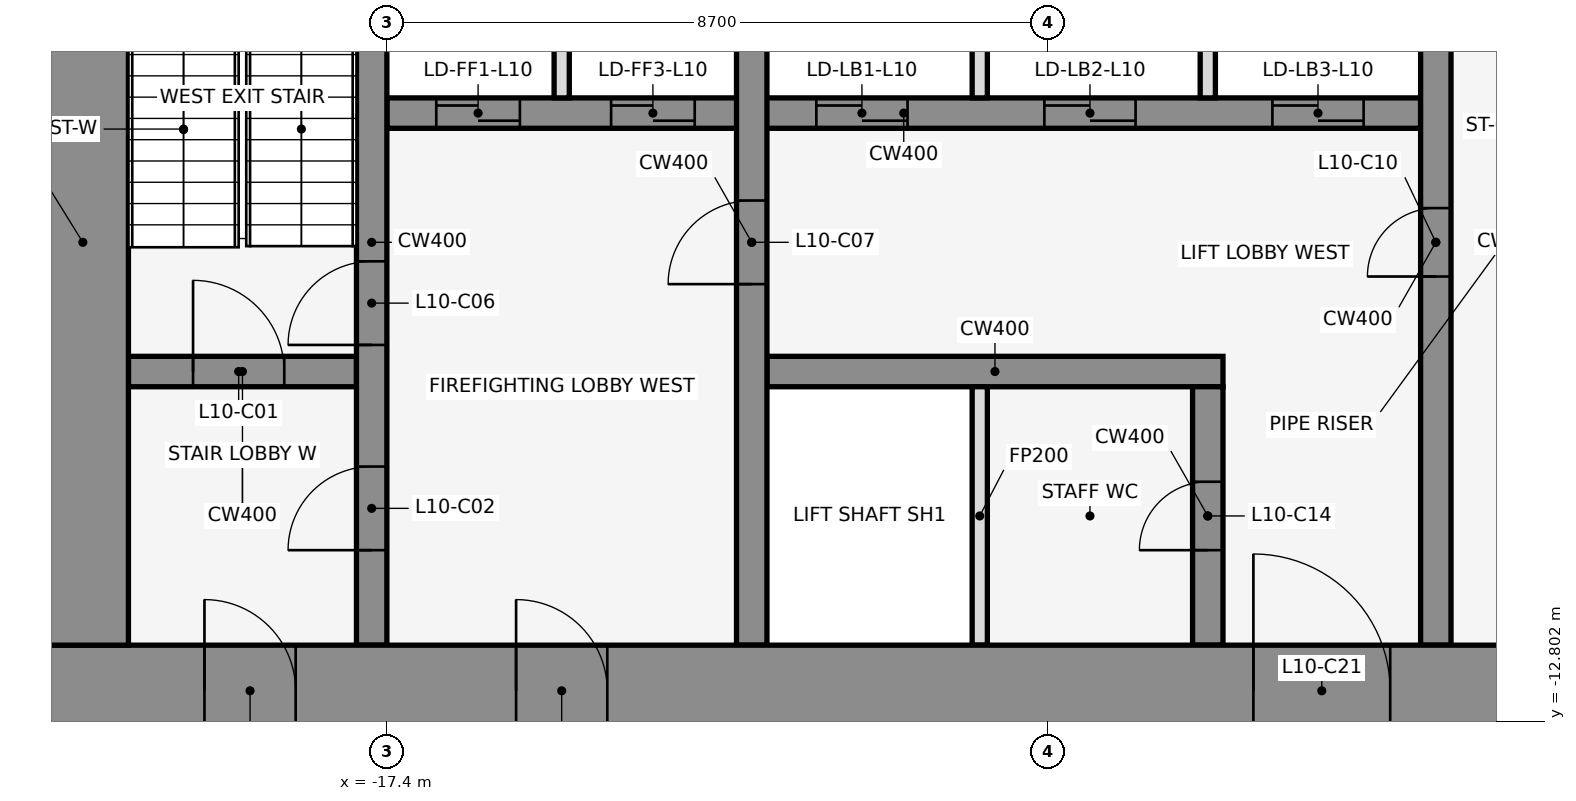
"""IFC4 building model, lengths in metres.
Left out: names, types, materials, properties, quantities, classifications, styles, units other than length and angle.
Written with IfcOpenShell. Run it as: python <this file> out.ifc"""

import sys

from ifc_helpers import new_model, si_unit, direction, frame, frame_2d, origin, place, context, subcontext, project, spatial, rectangle, extrude, element, fill, save


model = new_model("IFC4")
c1 = context("Model", 3, precision=1e-05, world=origin(), true_north=direction((0.0, 1.0)))
c2 = subcontext(c1, "Body", "Model", "MODEL_VIEW")
j1 = project(units=[si_unit("LENGTHUNIT", "METRE"), si_unit("PLANEANGLEUNIT", "RADIAN")], contexts=[c1])
p1 = place(None, origin())
s1 = spatial("IfcSite", under=j1, at=p1, CompositionType="ELEMENT")
p2 = place(p1, origin())
s2 = spatial("IfcBuilding", under=s1, at=p2, CompositionType="ELEMENT")
p3 = place(p2, frame((0.0, 0.0, 53.0)))
s3 = spatial("IfcBuildingStorey", under=s2, at=p3, CompositionType="ELEMENT", Elevation=53.0)
p4 = place(p3, frame((-20.8, -8.2, 0.0), z_axis=(0.0, 0.0, 1.0), x_axis=(1.0, 0.0, 0.0)))
e1 = element("IfcWall", 1, at=p4, inside=s3, PredefinedType="SHEAR", context=c2, shape_type="SweptSolid", body=[
    extrude(rectangle(XDim=3.0, YDim=0.4, at=frame_2d((1.5, 0.0))), origin(), (0.0, 0.0, 1.0), 4.5),
])
p5 = place(p4, frame((0.85, 0.0, 0.0)))
e2 = element("IfcOpeningElement", 2, at=p5, cuts=e1, PredefinedType="OPENING", context=c2, shape_type="SweptSolid", body=[
    extrude(rectangle(XDim=1.2, YDim=2.1, at=frame_2d((0.6, 1.05))), frame((0.0, 0.212, 0.0), z_axis=(0.0, -1.0, 0.0), x_axis=(1.0, 0.0, 0.0)), (0.0, 0.0, 1.0), 0.424),
])
p6 = place(p3, frame((-12.4, -8.2, 0.0), z_axis=(0.0, 0.0, 1.0), x_axis=(1.0, 0.0, 0.0)))
e3 = element("IfcWall", 3, at=p6, inside=s3, PredefinedType="SHEAR", context=c2, shape_type="SweptSolid", body=[
    extrude(rectangle(XDim=6.0, YDim=0.4, at=frame_2d((3.0, 0.0))), origin(), (0.0, 0.0, 1.0), 4.5),
])
p7 = place(p3, frame((-17.4, -4.8, 0.0), z_axis=(0.0, 0.0, 1.0), x_axis=(1.0, 0.0, 0.0)))
e4 = element("IfcWall", 4, at=p7, inside=s3, PredefinedType="SHEAR", context=c2, shape_type="SweptSolid", body=[
    extrude(rectangle(XDim=13.6, YDim=0.4, at=frame_2d((6.8, 0.0))), origin(), (0.0, 0.0, 1.0), 4.5),
])
p8 = place(p7, frame((0.65, 0.0, 0.0)))
e5 = element("IfcOpeningElement", 5, at=p8, cuts=e4, PredefinedType="OPENING", context=c2, shape_type="SweptSolid", body=[
    extrude(rectangle(XDim=1.1, YDim=2.1, at=frame_2d((0.55, 1.05))), frame((0.0, 0.212, 0.0), z_axis=(0.0, -1.0, 0.0), x_axis=(1.0, 0.0, 0.0)), (0.0, 0.0, 1.0), 0.424),
])
p9 = place(p7, frame((2.95, 0.0, 0.0)))
e6 = element("IfcOpeningElement", 6, at=p9, cuts=e4, PredefinedType="OPENING", context=c2, shape_type="SweptSolid", body=[
    extrude(rectangle(XDim=1.1, YDim=2.1, at=frame_2d((0.55, 1.05))), frame((0.0, 0.212, 0.0), z_axis=(0.0, -1.0, 0.0), x_axis=(1.0, 0.0, 0.0)), (0.0, 0.0, 1.0), 0.424),
])
p10 = place(p7, frame((5.65, 0.0, 0.0)))
e7 = element("IfcOpeningElement", 7, at=p10, cuts=e4, PredefinedType="OPENING", context=c2, shape_type="SweptSolid", body=[
    extrude(rectangle(XDim=1.2, YDim=2.1, at=frame_2d((0.6, 1.05))), frame((0.0, 0.212, 0.0), z_axis=(0.0, -1.0, 0.0), x_axis=(1.0, 0.0, 0.0)), (0.0, 0.0, 1.0), 0.424),
])
p11 = place(p7, frame((8.65, 0.0, 0.0)))
e8 = element("IfcOpeningElement", 8, at=p11, cuts=e4, PredefinedType="OPENING", context=c2, shape_type="SweptSolid", body=[
    extrude(rectangle(XDim=1.2, YDim=2.1, at=frame_2d((0.6, 1.05))), frame((0.0, 0.212, 0.0), z_axis=(0.0, -1.0, 0.0), x_axis=(1.0, 0.0, 0.0)), (0.0, 0.0, 1.0), 0.424),
])
p12 = place(p7, frame((11.65, 0.0, 0.0)))
e9 = element("IfcOpeningElement", 9, at=p12, cuts=e4, PredefinedType="OPENING", context=c2, shape_type="SweptSolid", body=[
    extrude(rectangle(XDim=1.2, YDim=2.1, at=frame_2d((0.6, 1.05))), frame((0.0, 0.212, 0.0), z_axis=(0.0, -1.0, 0.0), x_axis=(1.0, 0.0, 0.0)), (0.0, 0.0, 1.0), 0.424),
])
p13 = place(p3, frame((-17.6, -11.8, 0.0), z_axis=(0.0, 0.0, 1.0), x_axis=(0.0, 1.0, 0.0)))
e10 = element("IfcWall", 10, at=p13, inside=s3, PredefinedType="SHEAR", context=c2, shape_type="SweptSolid", body=[
    extrude(rectangle(XDim=10.6, YDim=0.4, at=frame_2d((5.3, 0.0))), origin(), (0.0, 0.0, 1.0), 4.5),
])
p14 = place(p13, frame((1.25, 0.0, 0.0)))
e11 = element("IfcOpeningElement", 11, at=p14, cuts=e10, PredefinedType="OPENING", context=c2, shape_type="SweptSolid", body=[
    extrude(rectangle(XDim=1.1, YDim=2.1, at=frame_2d((0.55, 1.05))), frame((0.0, 0.212, 0.0), z_axis=(0.0, -1.0, 0.0), x_axis=(1.0, 0.0, 0.0)), (0.0, 0.0, 1.0), 0.424),
])
p15 = place(p13, frame((3.95, 0.0, 0.0)))
e12 = element("IfcOpeningElement", 12, at=p15, cuts=e10, PredefinedType="OPENING", context=c2, shape_type="SweptSolid", body=[
    extrude(rectangle(XDim=1.1, YDim=2.1, at=frame_2d((0.55, 1.05))), frame((0.0, 0.212, 0.0), z_axis=(0.0, -1.0, 0.0), x_axis=(1.0, 0.0, 0.0)), (0.0, 0.0, 1.0), 0.424),
])
p16 = place(p3, frame((-15.1, -4.6, 0.0), z_axis=(0.0, 0.0, 1.0), x_axis=(0.0, 1.0, 0.0)))
e13 = element("IfcWall", 13, at=p16, inside=s3, PredefinedType="PARTITIONING", context=c2, shape_type="SweptSolid", body=[
    extrude(rectangle(XDim=3.4, YDim=0.2, at=frame_2d((1.7, 0.0))), origin(), (0.0, 0.0, 1.0), 3.418),
])
p17 = place(p3, frame((-12.6, -11.8, 0.0), z_axis=(0.0, 0.0, 1.0), x_axis=(0.0, 1.0, 0.0)))
e14 = element("IfcWall", 14, at=p17, inside=s3, PredefinedType="SHEAR", context=c2, shape_type="SweptSolid", body=[
    extrude(rectangle(XDim=10.6, YDim=0.4, at=frame_2d((5.3, 0.0))), origin(), (0.0, 0.0, 1.0), 4.5),
])
p18 = place(p17, frame((4.75, 0.0, 0.0)))
e15 = element("IfcOpeningElement", 15, at=p18, cuts=e14, PredefinedType="OPENING", context=c2, shape_type="SweptSolid", body=[
    extrude(rectangle(XDim=1.1, YDim=2.1, at=frame_2d((0.55, 1.05))), frame((0.0, 0.212, 0.0), z_axis=(0.0, -1.0, 0.0), x_axis=(1.0, 0.0, 0.0)), (0.0, 0.0, 1.0), 0.424),
])
for number, where, z_axis, x_axis in (
    (16, (-9.6, -11.8, 0.0), (0.0, 0.0, 1.0), (0.0, 1.0, 0.0)),
    (17, (-9.6, -4.6, 0.0), (0.0, 0.0, 1.0), (0.0, 1.0, 0.0)),
):
    element("IfcWall", number, at=place(p3, frame(where, z_axis=z_axis, x_axis=x_axis)), inside=s3, PredefinedType="PARTITIONING", context=c2, shape_type="SweptSolid", body=[
        extrude(rectangle(XDim=3.4, YDim=0.2, at=frame_2d((1.7, 0.0))), origin(), (0.0, 0.0, 1.0), 3.418),
    ])
p19 = place(p3, frame((-6.6, -11.8, 0.0), z_axis=(0.0, 0.0, 1.0), x_axis=(0.0, 1.0, 0.0)))
e18 = element("IfcWall", 18, at=p19, inside=s3, PredefinedType="SHEAR", context=c2, shape_type="SweptSolid", body=[
    extrude(rectangle(XDim=3.4, YDim=0.4, at=frame_2d((1.7, 0.0))), origin(), (0.0, 0.0, 1.0), 4.5),
])
p20 = place(p19, frame((1.25, 0.0, 0.0)))
e19 = element("IfcOpeningElement", 19, at=p20, cuts=e18, PredefinedType="OPENING", context=c2, shape_type="SweptSolid", body=[
    extrude(rectangle(XDim=0.9, YDim=2.1, at=frame_2d((0.45, 1.05))), frame((0.0, 0.212, 0.0), z_axis=(0.0, -1.0, 0.0), x_axis=(1.0, 0.0, 0.0)), (0.0, 0.0, 1.0), 0.424),
])
p21 = place(p3, frame((-6.6, -4.6, 0.0), z_axis=(0.0, 0.0, 1.0), x_axis=(0.0, 1.0, 0.0)))
e20 = element("IfcWall", 20, at=p21, inside=s3, PredefinedType="PARTITIONING", context=c2, shape_type="SweptSolid", body=[
    extrude(rectangle(XDim=3.4, YDim=0.2, at=frame_2d((1.7, 0.0))), origin(), (0.0, 0.0, 1.0), 3.418),
])
p22 = place(p3, frame((-3.6, -11.8, 0.0), z_axis=(0.0, 0.0, 1.0), x_axis=(0.0, 1.0, 0.0)))
e21 = element("IfcWall", 21, at=p22, inside=s3, PredefinedType="SHEAR", context=c2, shape_type="SweptSolid", body=[
    extrude(rectangle(XDim=10.6, YDim=0.4, at=frame_2d((5.3, 0.0))), origin(), (0.0, 0.0, 1.0), 4.5),
])
p23 = place(p22, frame((4.85, 0.0, 0.0)))
e22 = element("IfcOpeningElement", 22, at=p23, cuts=e21, PredefinedType="OPENING", context=c2, shape_type="SweptSolid", body=[
    extrude(rectangle(XDim=0.9, YDim=2.1, at=frame_2d((0.45, 1.05))), frame((0.0, 0.212, 0.0), z_axis=(0.0, -1.0, 0.0), x_axis=(1.0, 0.0, 0.0)), (0.0, 0.0, 1.0), 0.424),
])
p24 = place(p3, frame((-22.0, -12.4, 0.0), z_axis=(0.0, 0.0, 1.0), x_axis=(1.0, 0.0, 0.0)))
e23 = element("IfcWall", 23, at=p24, inside=s3, PredefinedType="SHEAR", context=c2, shape_type="SweptSolid", body=[
    extrude(rectangle(XDim=44.0, YDim=1.2, at=frame_2d((22.0, 0.0))), origin(), (0.0, 0.0, 1.0), 4.5),
])
p25 = place(p24, frame((2.2, 0.0, 0.0)))
e24 = element("IfcOpeningElement", 24, at=p25, cuts=e23, PredefinedType="OPENING", context=c2, shape_type="SweptSolid", body=[
    extrude(rectangle(XDim=1.2, YDim=2.1, at=frame_2d((0.6, 1.05))), frame((0.0, 0.612, 0.0), z_axis=(0.0, -1.0, 0.0), x_axis=(1.0, 0.0, 0.0)), (0.0, 0.0, 1.0), 1.224),
])
p26 = place(p24, frame((21.4, 0.0, 0.0)))
e25 = element("IfcOpeningElement", 25, at=p26, cuts=e23, PredefinedType="OPENING", context=c2, shape_type="SweptSolid", body=[
    extrude(rectangle(XDim=1.2, YDim=2.1, at=frame_2d((0.6, 1.05))), frame((0.0, 0.612, 0.0), z_axis=(0.0, -1.0, 0.0), x_axis=(1.0, 0.0, 0.0)), (0.0, 0.0, 1.0), 1.224),
])
p27 = place(p24, frame((40.6, 0.0, 0.0)))
e26 = element("IfcOpeningElement", 26, at=p27, cuts=e23, PredefinedType="OPENING", context=c2, shape_type="SweptSolid", body=[
    extrude(rectangle(XDim=1.2, YDim=2.1, at=frame_2d((0.6, 1.05))), frame((0.0, 0.612, 0.0), z_axis=(0.0, -1.0, 0.0), x_axis=(1.0, 0.0, 0.0)), (0.0, 0.0, 1.0), 1.224),
])
p28 = place(p24, frame((16.0, 0.0, 0.0)))
e27 = element("IfcOpeningElement", 27, at=p28, cuts=e23, PredefinedType="OPENING", context=c2, shape_type="SweptSolid", body=[
    extrude(rectangle(XDim=1.8, YDim=2.1, at=frame_2d((0.9, 1.05))), frame((0.0, 0.612, 0.0), z_axis=(0.0, -1.0, 0.0), x_axis=(1.0, 0.0, 0.0)), (0.0, 0.0, 1.0), 1.224),
])
p29 = place(p24, frame((6.3, 0.0, 0.0)))
e28 = element("IfcOpeningElement", 28, at=p29, cuts=e23, PredefinedType="OPENING", context=c2, shape_type="SweptSolid", body=[
    extrude(rectangle(XDim=1.2, YDim=2.1, at=frame_2d((0.6, 1.05))), frame((0.0, 0.612, 0.0), z_axis=(0.0, -1.0, 0.0), x_axis=(1.0, 0.0, 0.0)), (0.0, 0.0, 1.0), 1.224),
])
p30 = place(p24, frame((26.2, 0.0, 0.0)))
e29 = element("IfcOpeningElement", 29, at=p30, cuts=e23, PredefinedType="OPENING", context=c2, shape_type="SweptSolid", body=[
    extrude(rectangle(XDim=1.8, YDim=2.1, at=frame_2d((0.9, 1.05))), frame((0.0, 0.612, 0.0), z_axis=(0.0, -1.0, 0.0), x_axis=(1.0, 0.0, 0.0)), (0.0, 0.0, 1.0), 1.224),
])
p31 = place(p24, frame((36.5, 0.0, 0.0)))
e30 = element("IfcOpeningElement", 30, at=p31, cuts=e23, PredefinedType="OPENING", context=c2, shape_type="SweptSolid", body=[
    extrude(rectangle(XDim=1.2, YDim=2.1, at=frame_2d((0.6, 1.05))), frame((0.0, 0.612, 0.0), z_axis=(0.0, -1.0, 0.0), x_axis=(1.0, 0.0, 0.0)), (0.0, 0.0, 1.0), 1.224),
])
p32 = place(p3, frame((-21.4, -11.8, 0.0), z_axis=(0.0, 0.0, 1.0), x_axis=(0.0, 1.0, 0.0)))
e31 = element("IfcWall", 31, at=p32, inside=s3, PredefinedType="SHEAR", context=c2, shape_type="SweptSolid", body=[
    extrude(rectangle(XDim=10.6, YDim=1.2, at=frame_2d((5.3, 0.0))), origin(), (0.0, 0.0, 1.0), 4.5),
])
p33 = place(p5, origin())
e32 = element("IfcDoor", 32, at=p33, inside=s3, OperationType="SINGLE_SWING_LEFT", PredefinedType="DOOR", context=c2, shape_type="SweptSolid", body=[
    extrude(rectangle(XDim=1.2, YDim=2.1, at=frame_2d((0.6, 1.05))), frame((0.0, 0.025, 0.0), z_axis=(0.0, -1.0, 0.0), x_axis=(1.0, 0.0, 0.0)), (0.0, 0.0, 1.0), 0.05),
])
fill(e2, e32)
p34 = place(p14, frame((1.1, 0.0, 0.0), z_axis=(0.0, 0.0, 1.0), x_axis=(-1.0, 0.0, 0.0)))
e33 = element("IfcDoor", 33, at=p34, inside=s3, OperationType="SINGLE_SWING_LEFT", PredefinedType="DOOR", context=c2, shape_type="SweptSolid", body=[
    extrude(rectangle(XDim=1.1, YDim=2.1, at=frame_2d((0.55, 1.05))), frame((0.0, 0.025, 0.0), z_axis=(0.0, -1.0, 0.0), x_axis=(1.0, 0.0, 0.0)), (0.0, 0.0, 1.0), 0.05),
])
fill(e11, e33)
p35 = place(p8, origin())
e34 = element("IfcDoor", 34, at=p35, inside=s3, OperationType="DOUBLE_DOOR_SLIDING", PredefinedType="DOOR", context=c2, shape_type="SweptSolid", body=[
    extrude(rectangle(XDim=1.1, YDim=2.1, at=frame_2d((0.55, 1.05))), frame((0.0, 0.025, 0.0), z_axis=(0.0, -1.0, 0.0), x_axis=(1.0, 0.0, 0.0)), (0.0, 0.0, 1.0), 0.05),
])
fill(e5, e34)
p36 = place(p9, origin())
e35 = element("IfcDoor", 35, at=p36, inside=s3, OperationType="DOUBLE_DOOR_SLIDING", PredefinedType="DOOR", context=c2, shape_type="SweptSolid", body=[
    extrude(rectangle(XDim=1.1, YDim=2.1, at=frame_2d((0.55, 1.05))), frame((0.0, 0.025, 0.0), z_axis=(0.0, -1.0, 0.0), x_axis=(1.0, 0.0, 0.0)), (0.0, 0.0, 1.0), 0.05),
])
fill(e6, e35)
p37 = place(p10, origin())
e36 = element("IfcDoor", 36, at=p37, inside=s3, OperationType="DOUBLE_DOOR_SLIDING", PredefinedType="DOOR", context=c2, shape_type="SweptSolid", body=[
    extrude(rectangle(XDim=1.2, YDim=2.1, at=frame_2d((0.6, 1.05))), frame((0.0, 0.025, 0.0), z_axis=(0.0, -1.0, 0.0), x_axis=(1.0, 0.0, 0.0)), (0.0, 0.0, 1.0), 0.05),
])
fill(e7, e36)
p38 = place(p11, origin())
e37 = element("IfcDoor", 37, at=p38, inside=s3, OperationType="DOUBLE_DOOR_SLIDING", PredefinedType="DOOR", context=c2, shape_type="SweptSolid", body=[
    extrude(rectangle(XDim=1.2, YDim=2.1, at=frame_2d((0.6, 1.05))), frame((0.0, 0.025, 0.0), z_axis=(0.0, -1.0, 0.0), x_axis=(1.0, 0.0, 0.0)), (0.0, 0.0, 1.0), 0.05),
])
fill(e8, e37)
p39 = place(p12, origin())
e38 = element("IfcDoor", 38, at=p39, inside=s3, OperationType="DOUBLE_DOOR_SLIDING", PredefinedType="DOOR", context=c2, shape_type="SweptSolid", body=[
    extrude(rectangle(XDim=1.2, YDim=2.1, at=frame_2d((0.6, 1.05))), frame((0.0, 0.025, 0.0), z_axis=(0.0, -1.0, 0.0), x_axis=(1.0, 0.0, 0.0)), (0.0, 0.0, 1.0), 0.05),
])
fill(e9, e38)
p40 = place(p15, frame((1.1, 0.0, 0.0), z_axis=(0.0, 0.0, 1.0), x_axis=(-1.0, 0.0, 0.0)))
e39 = element("IfcDoor", 39, at=p40, inside=s3, OperationType="SINGLE_SWING_LEFT", PredefinedType="DOOR", context=c2, shape_type="SweptSolid", body=[
    extrude(rectangle(XDim=1.1, YDim=2.1, at=frame_2d((0.55, 1.05))), frame((0.0, 0.025, 0.0), z_axis=(0.0, -1.0, 0.0), x_axis=(1.0, 0.0, 0.0)), (0.0, 0.0, 1.0), 0.05),
])
fill(e12, e39)
p41 = place(p18, origin())
e40 = element("IfcDoor", 40, at=p41, inside=s3, OperationType="SINGLE_SWING_LEFT", PredefinedType="DOOR", context=c2, shape_type="SweptSolid", body=[
    extrude(rectangle(XDim=1.1, YDim=2.1, at=frame_2d((0.55, 1.05))), frame((0.0, 0.025, 0.0), z_axis=(0.0, -1.0, 0.0), x_axis=(1.0, 0.0, 0.0)), (0.0, 0.0, 1.0), 0.05),
])
fill(e15, e40)
p42 = place(p23, frame((0.9, 0.0, 0.0), z_axis=(0.0, 0.0, 1.0), x_axis=(-1.0, 0.0, 0.0)))
e41 = element("IfcDoor", 41, at=p42, inside=s3, OperationType="SINGLE_SWING_LEFT", PredefinedType="DOOR", context=c2, shape_type="SweptSolid", body=[
    extrude(rectangle(XDim=0.9, YDim=2.1, at=frame_2d((0.45, 1.05))), frame((0.0, 0.025, 0.0), z_axis=(0.0, -1.0, 0.0), x_axis=(1.0, 0.0, 0.0)), (0.0, 0.0, 1.0), 0.05),
])
fill(e22, e41)
p43 = place(p20, origin())
e42 = element("IfcDoor", 42, at=p43, inside=s3, OperationType="SINGLE_SWING_RIGHT", PredefinedType="DOOR", context=c2, shape_type="SweptSolid", body=[
    extrude(rectangle(XDim=0.9, YDim=2.1, at=frame_2d((0.45, 1.05))), frame((0.0, 0.025, 0.0), z_axis=(0.0, -1.0, 0.0), x_axis=(1.0, 0.0, 0.0)), (0.0, 0.0, 1.0), 0.05),
])
fill(e19, e42)
p44 = place(p25, frame((1.2, 0.0, 0.0), z_axis=(0.0, 0.0, 1.0), x_axis=(-1.0, 0.0, 0.0)))
e43 = element("IfcDoor", 43, at=p44, inside=s3, OperationType="SINGLE_SWING_RIGHT", PredefinedType="DOOR", context=c2, shape_type="SweptSolid", body=[
    extrude(rectangle(XDim=1.2, YDim=2.1, at=frame_2d((0.6, 1.05))), frame((0.0, 0.025, 0.0), z_axis=(0.0, -1.0, 0.0), x_axis=(1.0, 0.0, 0.0)), (0.0, 0.0, 1.0), 0.05),
])
fill(e24, e43)
p45 = place(p28, origin())
e44 = element("IfcDoor", 44, at=p45, inside=s3, OperationType="SINGLE_SWING_LEFT", PredefinedType="DOOR", context=c2, shape_type="SweptSolid", body=[
    extrude(rectangle(XDim=1.8, YDim=2.1, at=frame_2d((0.9, 1.05))), frame((0.0, 0.025, 0.0), z_axis=(0.0, -1.0, 0.0), x_axis=(1.0, 0.0, 0.0)), (0.0, 0.0, 1.0), 0.05),
])
fill(e27, e44)
p46 = place(p29, frame((1.2, 0.0, 0.0), z_axis=(0.0, 0.0, 1.0), x_axis=(-1.0, 0.0, 0.0)))
e45 = element("IfcDoor", 45, at=p46, inside=s3, OperationType="SINGLE_SWING_RIGHT", PredefinedType="DOOR", context=c2, shape_type="SweptSolid", body=[
    extrude(rectangle(XDim=1.2, YDim=2.1, at=frame_2d((0.6, 1.05))), frame((0.0, 0.025, 0.0), z_axis=(0.0, -1.0, 0.0), x_axis=(1.0, 0.0, 0.0)), (0.0, 0.0, 1.0), 0.05),
])
fill(e28, e45)
save(model, sys.argv[1])
